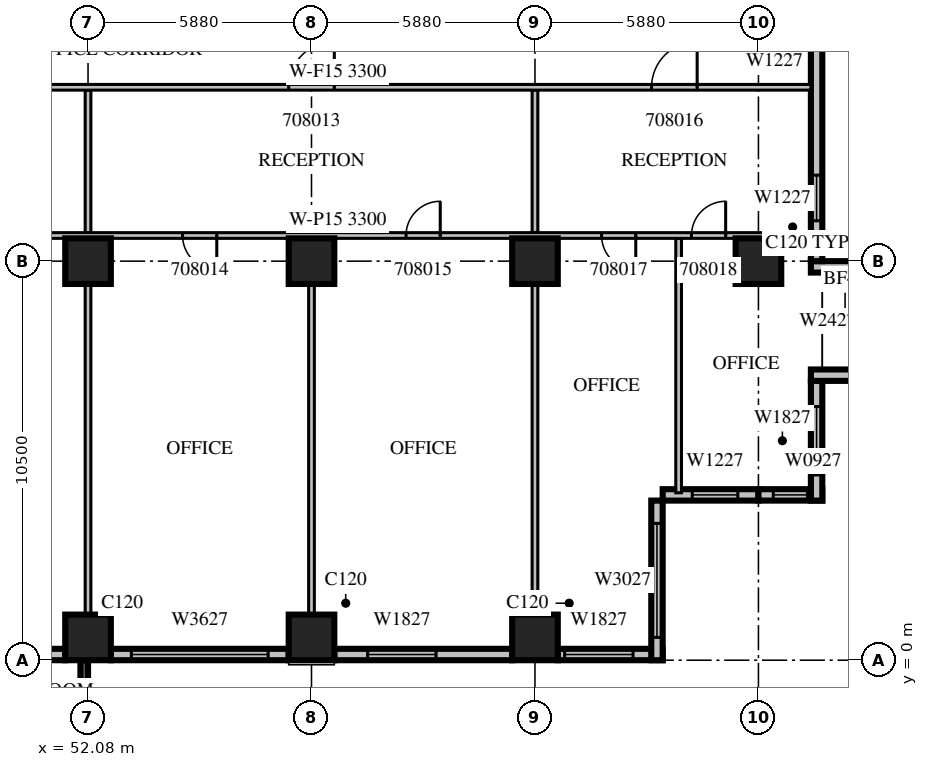
"""IFC4 building model, lengths in metres.
Left out: names, types, materials, properties, quantities, classifications, styles, units other than length and angle.
Written with IfcOpenShell. Run it as: python <this file> out.ifc"""

import sys

from ifc_helpers import new_model, si_unit, direction, frame, frame_2d, origin, origin_2d, place, context, subcontext, project, spatial, rectangle, extrude, source, transform, mapped, element, fill, save


model = new_model("IFC4")
c1 = context("Model", 3, precision=1e-05, world=origin(), true_north=direction((0.0, 1.0)))
c2 = subcontext(c1, "Body", "Model", "MODEL_VIEW")
j1 = project(units=[si_unit("LENGTHUNIT", "METRE"), si_unit("PLANEANGLEUNIT", "RADIAN")], contexts=[c1])
p1 = place(None, origin())
s1 = spatial("IfcSite", under=j1, at=p1, CompositionType="ELEMENT")
p2 = place(p1, origin())
s2 = spatial("IfcBuilding", under=s1, at=p2, CompositionType="ELEMENT")
p3 = place(p2, frame((0.0, 0.0, 44.7)))
s3 = spatial("IfcBuildingStorey", under=s2, at=p3, CompositionType="ELEMENT", Elevation=44.7)
m1 = source(origin(), c2, "Body", "SweptSolid", [
    extrude(rectangle(XDim=1.2, YDim=1.2, at=origin_2d()), origin(), (0.0, 0.0, 1.0), 4.2),
])
for number, where, z_axis, x_axis in (
    (1, (52.08, 0.6, 0.0), (0.0, 0.0, 1.0), (1.0, 0.0, 0.0)),
    (2, (57.96, 0.6, 0.0), (0.0, 0.0, 1.0), (1.0, 0.0, 0.0)),
    (3, (63.84, 0.6, 0.0), (0.0, 0.0, 1.0), (1.0, 0.0, 0.0)),
    (4, (52.08, 10.5, 0.0), (0.0, 0.0, 1.0), (1.0, 0.0, 0.0)),
    (5, (57.96, 10.5, 0.0), (0.0, 0.0, 1.0), (1.0, 0.0, 0.0)),
    (6, (63.84, 10.5, 0.0), (0.0, 0.0, 1.0), (1.0, 0.0, 0.0)),
    (7, (69.72, 10.5, 0.0), (0.0, 0.0, 1.0), (1.0, 0.0, 0.0)),
):
    element("IfcColumn", number, at=place(p3, frame(where, z_axis=z_axis, x_axis=x_axis)), inside=s3, PredefinedType="COLUMN", context=c2, shape_type="MappedRepresentation", body=[
        mapped(m1, transform((0.0, 0.0, 0.0), scale=1.0)),
    ])
m2 = source(origin(), c2, "Body", "SweptSolid", [
    extrude(rectangle(XDim=4.68, YDim=0.3, at=frame_2d((2.34, 0.0))), origin(), (0.0, 0.0, 1.0), 3.8),
])
p4 = place(p3, frame((46.8, 0.15, 0.0), z_axis=(0.0, 0.0, 1.0), x_axis=(1.0, 0.0, 0.0)))
e8 = element("IfcWall", 8, at=p4, inside=s3, PredefinedType="STANDARD", context=c2, shape_type="MappedRepresentation", body=[
    mapped(m2, transform((0.0, 0.0, 0.0), scale=1.0)),
])
m3 = source(origin(), c2, "Body", "SweptSolid", [
    extrude(rectangle(XDim=1.0, YDim=2.1, at=frame_2d((0.5, 1.05))), frame((0.0, 0.16, 0.0), z_axis=(0.0, -1.0, 0.0), x_axis=(1.0, 0.0, 0.0)), (0.0, 0.0, 1.0), 0.32),
])
p5 = place(p4, frame((1.84, 0.0, 0.0)))
e9 = element("IfcOpeningElement", 9, at=p5, cuts=e8, PredefinedType="OPENING", context=c2, shape_type="MappedRepresentation", body=[
    mapped(m3, transform((0.0, 0.0, 0.0), scale=1.0)),
])
p6 = place(p3, frame((52.68, 0.15, 0.0), z_axis=(0.0, 0.0, 1.0), x_axis=(1.0, 0.0, 0.0)))
e10 = element("IfcWall", 10, at=p6, inside=s3, PredefinedType="STANDARD", context=c2, shape_type="MappedRepresentation", body=[
    mapped(m2, transform((0.0, 0.0, 0.0), scale=1.0)),
])
m4 = source(origin(), c2, "Body", "SweptSolid", [
    extrude(rectangle(XDim=3.6, YDim=2.7, at=frame_2d((1.8, 1.35))), frame((0.0, 0.16, 0.0), z_axis=(0.0, -1.0, 0.0), x_axis=(1.0, 0.0, 0.0)), (0.0, 0.0, 1.0), 0.32),
])
p7 = place(p6, frame((0.54, 0.0, 0.6)))
e11 = element("IfcOpeningElement", 11, at=p7, cuts=e10, PredefinedType="OPENING", context=c2, shape_type="MappedRepresentation", body=[
    mapped(m4, transform((0.0, 0.0, 0.0), scale=1.0)),
])
p8 = place(p3, frame((58.56, 0.15, 0.0), z_axis=(0.0, 0.0, 1.0), x_axis=(1.0, 0.0, 0.0)))
e12 = element("IfcWall", 12, at=p8, inside=s3, PredefinedType="STANDARD", context=c2, shape_type="MappedRepresentation", body=[
    mapped(m2, transform((0.0, 0.0, 0.0), scale=1.0)),
])
m5 = source(origin(), c2, "Body", "SweptSolid", [
    extrude(rectangle(XDim=1.8, YDim=2.7, at=frame_2d((0.9, 1.35))), frame((0.0, 0.16, 0.0), z_axis=(0.0, -1.0, 0.0), x_axis=(1.0, 0.0, 0.0)), (0.0, 0.0, 1.0), 0.32),
])
p9 = place(p8, frame((0.877, 0.0, 0.6)))
e13 = element("IfcOpeningElement", 13, at=p9, cuts=e12, PredefinedType="OPENING", context=c2, shape_type="MappedRepresentation", body=[
    mapped(m5, transform((0.0, 0.0, 0.0), scale=1.0)),
])
m6 = source(origin(), c2, "Body", "SweptSolid", [
    extrude(rectangle(XDim=2.76, YDim=0.3, at=frame_2d((1.38, 0.0))), origin(), (0.0, 0.0, 1.0), 3.8),
])
p10 = place(p3, frame((64.44, 0.15, 0.0), z_axis=(0.0, 0.0, 1.0), x_axis=(1.0, 0.0, 0.0)))
e14 = element("IfcWall", 14, at=p10, inside=s3, PredefinedType="STANDARD", context=c2, shape_type="MappedRepresentation", body=[
    mapped(m6, transform((0.0, 0.0, 0.0), scale=1.0)),
])
p11 = place(p10, frame((0.18, 0.0, 0.6)))
e15 = element("IfcOpeningElement", 15, at=p11, cuts=e14, PredefinedType="OPENING", context=c2, shape_type="MappedRepresentation", body=[
    mapped(m5, transform((0.0, 0.0, 0.0), scale=1.0)),
])
m7 = source(origin(), c2, "Body", "SweptSolid", [
    extrude(rectangle(XDim=4.2, YDim=0.3, at=frame_2d((2.1, 0.0))), origin(), (0.0, 0.0, 1.0), 3.8),
])
p12 = place(p3, frame((67.05, 0.0, 0.0), z_axis=(0.0, 0.0, 1.0), x_axis=(0.0, 1.0, 0.0)))
e16 = element("IfcWall", 16, at=p12, inside=s3, PredefinedType="STANDARD", context=c2, shape_type="MappedRepresentation", body=[
    mapped(m7, transform((0.0, 0.0, 0.0), scale=1.0)),
])
m8 = source(origin(), c2, "Body", "SweptSolid", [
    extrude(rectangle(XDim=3.0, YDim=2.7, at=frame_2d((1.5, 1.35))), frame((0.0, 0.16, 0.0), z_axis=(0.0, -1.0, 0.0), x_axis=(1.0, 0.0, 0.0)), (0.0, 0.0, 1.0), 0.32),
])
p13 = place(p12, frame((0.6, 0.0, 0.6)))
e17 = element("IfcOpeningElement", 17, at=p13, cuts=e16, PredefinedType="OPENING", context=c2, shape_type="MappedRepresentation", body=[
    mapped(m8, transform((0.0, 0.0, 0.0), scale=1.0)),
])
m9 = source(origin(), c2, "Body", "SweptSolid", [
    extrude(rectangle(XDim=2.52, YDim=0.3, at=frame_2d((1.26, 0.0))), origin(), (0.0, 0.0, 1.0), 3.8),
])
p14 = place(p3, frame((67.2, 4.35, 0.0), z_axis=(0.0, 0.0, 1.0), x_axis=(1.0, 0.0, 0.0)))
e18 = element("IfcWall", 18, at=p14, inside=s3, PredefinedType="STANDARD", context=c2, shape_type="MappedRepresentation", body=[
    mapped(m9, transform((0.0, 0.0, 0.0), scale=1.0)),
])
m10 = source(origin(), c2, "Body", "SweptSolid", [
    extrude(rectangle(XDim=1.2, YDim=2.7, at=frame_2d((0.6, 1.35))), frame((0.0, 0.16, 0.0), z_axis=(0.0, -1.0, 0.0), x_axis=(1.0, 0.0, 0.0)), (0.0, 0.0, 1.0), 0.32),
])
p15 = place(p14, frame((0.777, 0.0, 0.6)))
e19 = element("IfcOpeningElement", 19, at=p15, cuts=e18, PredefinedType="OPENING", context=c2, shape_type="MappedRepresentation", body=[
    mapped(m10, transform((0.0, 0.0, 0.0), scale=1.0)),
])
m11 = source(origin(), c2, "Body", "SweptSolid", [
    extrude(rectangle(XDim=1.68, YDim=0.3, at=frame_2d((0.84, 0.0))), origin(), (0.0, 0.0, 1.0), 3.8),
])
p16 = place(p3, frame((69.72, 4.35, 0.0), z_axis=(0.0, 0.0, 1.0), x_axis=(1.0, 0.0, 0.0)))
e20 = element("IfcWall", 20, at=p16, inside=s3, PredefinedType="STANDARD", context=c2, shape_type="MappedRepresentation", body=[
    mapped(m11, transform((0.0, 0.0, 0.0), scale=1.0)),
])
m12 = source(origin(), c2, "Body", "SweptSolid", [
    extrude(rectangle(XDim=0.9, YDim=2.7, at=frame_2d((0.45, 1.35))), frame((0.0, 0.16, 0.0), z_axis=(0.0, -1.0, 0.0), x_axis=(1.0, 0.0, 0.0)), (0.0, 0.0, 1.0), 0.32),
])
p17 = place(p16, frame((0.39, 0.0, 0.6)))
e21 = element("IfcOpeningElement", 21, at=p17, cuts=e20, PredefinedType="OPENING", context=c2, shape_type="MappedRepresentation", body=[
    mapped(m12, transform((0.0, 0.0, 0.0), scale=1.0)),
])
m13 = source(origin(), c2, "Body", "SweptSolid", [
    extrude(rectangle(XDim=3.15, YDim=0.3, at=frame_2d((1.575, 0.0))), origin(), (0.0, 0.0, 1.0), 3.8),
])
p18 = place(p3, frame((71.25, 4.2, 0.0), z_axis=(0.0, 0.0, 1.0), x_axis=(0.0, 1.0, 0.0)))
e22 = element("IfcWall", 22, at=p18, inside=s3, PredefinedType="STANDARD", context=c2, shape_type="MappedRepresentation", body=[
    mapped(m13, transform((0.0, 0.0, 0.0), scale=1.0)),
])
p19 = place(p18, frame((0.675, 0.0, 0.6)))
e23 = element("IfcOpeningElement", 23, at=p19, cuts=e22, PredefinedType="OPENING", context=c2, shape_type="MappedRepresentation", body=[
    mapped(m5, transform((0.0, 0.0, 0.0), scale=1.0)),
])
m14 = source(origin(), c2, "Body", "SweptSolid", [
    extrude(rectangle(XDim=1.2, YDim=0.3, at=frame_2d((0.6, 0.0))), origin(), (0.0, 0.0, 1.0), 3.8),
])
for number, where, z_axis, x_axis in (
    (24, (71.1, 7.5, 0.0), (0.0, 0.0, 1.0), (1.0, 0.0, 0.0)),
    (25, (71.1, 10.35, 0.0), (0.0, 0.0, 1.0), (1.0, 0.0, 0.0)),
):
    element("IfcWall", number, at=place(p3, frame(where, z_axis=z_axis, x_axis=x_axis)), inside=s3, PredefinedType="STANDARD", context=c2, shape_type="MappedRepresentation", body=[
        mapped(m14, transform((0.0, 0.0, 0.0), scale=1.0)),
    ])
m15 = source(origin(), c2, "Body", "SweptSolid", [
    extrude(rectangle(XDim=6.3, YDim=0.3, at=frame_2d((3.15, 0.0))), origin(), (0.0, 0.0, 1.0), 3.8),
])
p20 = place(p3, frame((71.25, 10.5, 0.0), z_axis=(0.0, 0.0, 1.0), x_axis=(0.0, 1.0, 0.0)))
e26 = element("IfcWall", 26, at=p20, inside=s3, PredefinedType="STANDARD", context=c2, shape_type="MappedRepresentation", body=[
    mapped(m15, transform((0.0, 0.0, 0.0), scale=1.0)),
])
p21 = place(p20, frame((1.062, 0.0, 0.6)))
e27 = element("IfcOpeningElement", 27, at=p21, cuts=e26, PredefinedType="OPENING", context=c2, shape_type="MappedRepresentation", body=[
    mapped(m10, transform((0.0, 0.0, 0.0), scale=1.0)),
])
m16 = source(origin(), c2, "Body", "SweptSolid", [
    extrude(rectangle(XDim=3.9, YDim=0.2, at=frame_2d((1.95, 0.0))), origin(), (0.0, 0.0, 1.0), 3.79),
])
p22 = place(p3, frame((51.98, 0.0, 0.0), z_axis=(0.0, 0.0, 1.0), x_axis=(0.0, -1.0, 0.0)))
e28 = element("IfcWall", 28, at=p22, inside=s3, PredefinedType="SOLIDWALL", context=c2, shape_type="MappedRepresentation", body=[
    mapped(m16, transform((0.0, 0.0, 0.0), scale=1.0)),
])
m17 = source(origin(), c2, "Body", "SweptSolid", [
    extrude(rectangle(XDim=2.4, YDim=2.7, at=frame_2d((1.2, 1.35))), frame((0.0, 0.11, 0.0), z_axis=(0.0, -1.0, 0.0), x_axis=(1.0, 0.0, 0.0)), (0.0, 0.0, 1.0), 0.22),
])
p23 = place(p22, frame((0.75, 0.0, 0.6)))
e29 = element("IfcOpeningElement", 29, at=p23, cuts=e28, PredefinedType="OPENING", context=c2, shape_type="MappedRepresentation", body=[
    mapped(m17, transform((0.0, 0.0, 0.0), scale=1.0)),
])
m18 = source(origin(), c2, "Body", "SweptSolid", [
    extrude(rectangle(XDim=8.702, YDim=0.15, at=frame_2d((4.351, 0.0))), origin(), (0.0, 0.0, 1.0), 3.8),
])
p24 = place(p3, frame((57.96, 1.199, 0.0), z_axis=(0.0, 0.0, 1.0), x_axis=(0.0, 1.0, 0.0)))
e30 = element("IfcWall", 30, at=p24, inside=s3, PredefinedType="PARTITIONING", context=c2, shape_type="MappedRepresentation", body=[
    mapped(m18, transform((0.0, 0.0, 0.0), scale=1.0)),
])
m19 = source(origin(), c2, "Body", "SweptSolid", [
    extrude(rectangle(XDim=6.695, YDim=0.15, at=frame_2d((3.348, 0.0))), origin(), (0.0, 0.0, 1.0), 3.8),
])
p25 = place(p3, frame((67.62, 4.405, 0.0), z_axis=(0.0, 0.0, 1.0), x_axis=(0.0, 1.0, 0.0)))
e31 = element("IfcWall", 31, at=p25, inside=s3, PredefinedType="PARTITIONING", context=c2, shape_type="MappedRepresentation", body=[
    mapped(m19, transform((0.0, 0.0, 0.0), scale=1.0)),
])
p26 = place(p3, frame((52.08, 1.199, 0.0), z_axis=(0.0, 0.0, 1.0), x_axis=(0.0, 1.0, 0.0)))
e32 = element("IfcWall", 32, at=p26, inside=s3, PredefinedType="PARTITIONING", context=c2, shape_type="MappedRepresentation", body=[
    mapped(m18, transform((0.0, 0.0, 0.0), scale=1.0)),
])
m20 = source(origin(), c2, "Body", "SweptSolid", [
    extrude(rectangle(XDim=3.75, YDim=0.15, at=frame_2d((1.875, 0.0))), origin(), (0.0, 0.0, 1.0), 3.8),
])
p27 = place(p3, frame((52.08, 11.25, 0.0), z_axis=(0.0, 0.0, 1.0), x_axis=(0.0, 1.0, 0.0)))
e33 = element("IfcWall", 33, at=p27, inside=s3, PredefinedType="PARTITIONING", context=c2, shape_type="MappedRepresentation", body=[
    mapped(m20, transform((0.0, 0.0, 0.0), scale=1.0)),
])
p28 = place(p3, frame((63.84, 1.199, 0.0), z_axis=(0.0, 0.0, 1.0), x_axis=(0.0, 1.0, 0.0)))
e34 = element("IfcWall", 34, at=p28, inside=s3, PredefinedType="PARTITIONING", context=c2, shape_type="MappedRepresentation", body=[
    mapped(m18, transform((0.0, 0.0, 0.0), scale=1.0)),
])
p29 = place(p3, frame((63.84, 11.25, 0.0), z_axis=(0.0, 0.0, 1.0), x_axis=(0.0, 1.0, 0.0)))
e35 = element("IfcWall", 35, at=p29, inside=s3, PredefinedType="PARTITIONING", context=c2, shape_type="MappedRepresentation", body=[
    mapped(m20, transform((0.0, 0.0, 0.0), scale=1.0)),
])
p30 = place(p3, frame((71.1, 11.175, 0.0), z_axis=(0.0, 0.0, 1.0), x_axis=(-1.0, 0.0, 0.0)))
e36 = element("IfcWall", 36, at=p30, inside=s3, PredefinedType="PARTITIONING", context=c2, shape_type="SweptSolid", body=[
    extrude(rectangle(XDim=24.9, YDim=0.15, at=frame_2d((12.45, 0.0))), origin(), (0.0, 0.0, 1.0), 3.3),
])
m21 = source(origin(), c2, "Body", "SweptSolid", [
    extrude(rectangle(XDim=1.1, YDim=2.1, at=frame_2d((0.55, 1.05))), frame((0.0, 0.085, 0.0), z_axis=(0.0, -1.0, 0.0), x_axis=(1.0, 0.0, 0.0)), (0.0, 0.0, 1.0), 0.17),
])
p31 = place(p30, frame((22.875, 0.0, 0.0)))
e37 = element("IfcOpeningElement", 37, at=p31, cuts=e36, PredefinedType="OPENING", context=c2, shape_type="MappedRepresentation", body=[
    mapped(m21, transform((0.0, 0.0, 0.0), scale=1.0)),
])
m22 = source(origin(), c2, "Body", "SweptSolid", [
    extrude(rectangle(XDim=0.9, YDim=2.1, at=frame_2d((0.45, 1.05))), frame((0.0, 0.085, 0.0), z_axis=(0.0, -1.0, 0.0), x_axis=(1.0, 0.0, 0.0)), (0.0, 0.0, 1.0), 0.17),
])
p32 = place(p30, frame((15.633, 0.0, 0.0)))
e38 = element("IfcOpeningElement", 38, at=p32, cuts=e36, PredefinedType="OPENING", context=c2, shape_type="MappedRepresentation", body=[
    mapped(m22, transform((0.0, 0.0, 0.0), scale=1.0)),
])
p33 = place(p30, frame((9.752, 0.0, 0.0)))
e39 = element("IfcOpeningElement", 39, at=p33, cuts=e36, PredefinedType="OPENING", context=c2, shape_type="MappedRepresentation", body=[
    mapped(m22, transform((0.0, 0.0, 0.0), scale=1.0)),
])
p34 = place(p30, frame((4.607, 0.0, 0.0)))
e40 = element("IfcOpeningElement", 40, at=p34, cuts=e36, PredefinedType="OPENING", context=c2, shape_type="MappedRepresentation", body=[
    mapped(m22, transform((0.0, 0.0, 0.0), scale=1.0)),
])
p35 = place(p30, frame((2.243, 0.0, 0.0)))
e41 = element("IfcOpeningElement", 41, at=p35, cuts=e36, PredefinedType="OPENING", context=c2, shape_type="MappedRepresentation", body=[
    mapped(m22, transform((0.0, 0.0, 0.0), scale=1.0)),
])
m23 = source(origin(), c2, "Body", "SweptSolid", [
    extrude(rectangle(XDim=24.9, YDim=0.15, at=frame_2d((12.45, 0.0))), origin(), (0.0, 0.0, 1.0), 3.3),
])
p36 = place(p3, frame((71.1, 15.075, 0.0), z_axis=(0.0, 0.0, 1.0), x_axis=(-1.0, 0.0, 0.0)))
e42 = element("IfcWall", 42, at=p36, inside=s3, PredefinedType="PARTITIONING", context=c2, shape_type="MappedRepresentation", body=[
    mapped(m23, transform((0.0, 0.0, 0.0), scale=1.0)),
])
p37 = place(p36, frame((23.188, 0.0, 0.0)))
e43 = element("IfcOpeningElement", 43, at=p37, cuts=e42, PredefinedType="OPENING", context=c2, shape_type="MappedRepresentation", body=[
    mapped(m21, transform((0.0, 0.0, 0.0), scale=1.0)),
])
p38 = place(p36, frame((20.348, 0.0, 0.0)))
e44 = element("IfcOpeningElement", 44, at=p38, cuts=e42, PredefinedType="OPENING", context=c2, shape_type="MappedRepresentation", body=[
    mapped(m22, transform((0.0, 0.0, 0.0), scale=1.0)),
])
m24 = source(origin(), c2, "Body", "SweptSolid", [
    extrude(rectangle(XDim=1.2, YDim=2.1, at=frame_2d((0.6, 1.05))), frame((0.0, 0.085, 0.0), z_axis=(0.0, -1.0, 0.0), x_axis=(1.0, 0.0, 0.0)), (0.0, 0.0, 1.0), 0.17),
])
p39 = place(p36, frame((12.54, 0.0, 0.0)))
e45 = element("IfcOpeningElement", 45, at=p39, cuts=e42, PredefinedType="OPENING", context=c2, shape_type="MappedRepresentation", body=[
    mapped(m24, transform((0.0, 0.0, 0.0), scale=1.0)),
])
p40 = place(p36, frame((2.993, 0.0, 0.0)))
e46 = element("IfcOpeningElement", 46, at=p40, cuts=e42, PredefinedType="OPENING", context=c2, shape_type="MappedRepresentation", body=[
    mapped(m24, transform((0.0, 0.0, 0.0), scale=1.0)),
])
m25 = source(origin(), c2, "Body", "SweptSolid", [
    extrude(rectangle(XDim=3.6, YDim=2.7, at=frame_2d((1.8, 1.35))), frame((0.0, 0.03, 0.0), z_axis=(0.0, -1.0, 0.0), x_axis=(1.0, 0.0, 0.0)), (0.0, 0.0, 1.0), 0.06),
])
p41 = place(p7, origin())
e47 = element("IfcWindow", 47, at=p41, inside=s3, PartitioningType="SINGLE_PANEL", PredefinedType="WINDOW", context=c2, shape_type="MappedRepresentation", body=[
    mapped(m25, transform((0.0, 0.0, 0.0), scale=1.0)),
])
fill(e11, e47)
m26 = source(origin(), c2, "Body", "SweptSolid", [
    extrude(rectangle(XDim=1.8, YDim=2.7, at=frame_2d((0.9, 1.35))), frame((0.0, 0.03, 0.0), z_axis=(0.0, -1.0, 0.0), x_axis=(1.0, 0.0, 0.0)), (0.0, 0.0, 1.0), 0.06),
])
p42 = place(p9, origin())
e48 = element("IfcWindow", 48, at=p42, inside=s3, PartitioningType="SINGLE_PANEL", PredefinedType="WINDOW", context=c2, shape_type="MappedRepresentation", body=[
    mapped(m26, transform((0.0, 0.0, 0.0), scale=1.0)),
])
fill(e13, e48)
p43 = place(p11, origin())
e49 = element("IfcWindow", 49, at=p43, inside=s3, PartitioningType="SINGLE_PANEL", PredefinedType="WINDOW", context=c2, shape_type="MappedRepresentation", body=[
    mapped(m26, transform((0.0, 0.0, 0.0), scale=1.0)),
])
fill(e15, e49)
m27 = source(origin(), c2, "Body", "SweptSolid", [
    extrude(rectangle(XDim=3.0, YDim=2.7, at=frame_2d((1.5, 1.35))), frame((0.0, 0.03, 0.0), z_axis=(0.0, -1.0, 0.0), x_axis=(1.0, 0.0, 0.0)), (0.0, 0.0, 1.0), 0.06),
])
p44 = place(p13, origin())
e50 = element("IfcWindow", 50, at=p44, inside=s3, PartitioningType="SINGLE_PANEL", PredefinedType="WINDOW", context=c2, shape_type="MappedRepresentation", body=[
    mapped(m27, transform((0.0, 0.0, 0.0), scale=1.0)),
])
fill(e17, e50)
m28 = source(origin(), c2, "Body", "SweptSolid", [
    extrude(rectangle(XDim=1.2, YDim=2.7, at=frame_2d((0.6, 1.35))), frame((0.0, 0.03, 0.0), z_axis=(0.0, -1.0, 0.0), x_axis=(1.0, 0.0, 0.0)), (0.0, 0.0, 1.0), 0.06),
])
p45 = place(p15, origin())
e51 = element("IfcWindow", 51, at=p45, inside=s3, PartitioningType="SINGLE_PANEL", PredefinedType="WINDOW", context=c2, shape_type="MappedRepresentation", body=[
    mapped(m28, transform((0.0, 0.0, 0.0), scale=1.0)),
])
fill(e19, e51)
m29 = source(origin(), c2, "Body", "SweptSolid", [
    extrude(rectangle(XDim=0.9, YDim=2.7, at=frame_2d((0.45, 1.35))), frame((0.0, 0.03, 0.0), z_axis=(0.0, -1.0, 0.0), x_axis=(1.0, 0.0, 0.0)), (0.0, 0.0, 1.0), 0.06),
])
p46 = place(p17, origin())
e52 = element("IfcWindow", 52, at=p46, inside=s3, PartitioningType="SINGLE_PANEL", PredefinedType="WINDOW", context=c2, shape_type="MappedRepresentation", body=[
    mapped(m29, transform((0.0, 0.0, 0.0), scale=1.0)),
])
fill(e21, e52)
p47 = place(p19, origin())
e53 = element("IfcWindow", 53, at=p47, inside=s3, PartitioningType="SINGLE_PANEL", PredefinedType="WINDOW", context=c2, shape_type="MappedRepresentation", body=[
    mapped(m26, transform((0.0, 0.0, 0.0), scale=1.0)),
])
fill(e23, e53)
p48 = place(p21, origin())
e54 = element("IfcWindow", 54, at=p48, inside=s3, PartitioningType="SINGLE_PANEL", PredefinedType="WINDOW", context=c2, shape_type="MappedRepresentation", body=[
    mapped(m28, transform((0.0, 0.0, 0.0), scale=1.0)),
])
fill(e27, e54)
m30 = source(origin(), c2, "Body", "SweptSolid", [
    extrude(rectangle(XDim=1.2, YDim=2.1, at=frame_2d((0.6, 1.05))), frame((0.0, 0.025, 0.0), z_axis=(0.0, -1.0, 0.0), x_axis=(1.0, 0.0, 0.0)), (0.0, 0.0, 1.0), 0.05),
])
p49 = place(p39, origin())
e55 = element("IfcDoor", 55, at=p49, inside=s3, OperationType="SINGLE_SWING_RIGHT", PredefinedType="DOOR", context=c2, shape_type="MappedRepresentation", body=[
    mapped(m30, transform((0.0, 0.0, 0.0), scale=1.0)),
])
fill(e45, e55)
m31 = source(origin(), c2, "Body", "SweptSolid", [
    extrude(rectangle(XDim=0.9, YDim=2.1, at=frame_2d((0.45, 1.05))), frame((0.0, 0.025, 0.0), z_axis=(0.0, -1.0, 0.0), x_axis=(1.0, 0.0, 0.0)), (0.0, 0.0, 1.0), 0.05),
])
p50 = place(p32, origin())
e56 = element("IfcDoor", 56, at=p50, inside=s3, OperationType="SINGLE_SWING_LEFT", PredefinedType="DOOR", context=c2, shape_type="MappedRepresentation", body=[
    mapped(m31, transform((0.0, 0.0, 0.0), scale=1.0)),
])
fill(e38, e56)
p51 = place(p33, origin())
e57 = element("IfcDoor", 57, at=p51, inside=s3, OperationType="SINGLE_SWING_RIGHT", PredefinedType="DOOR", context=c2, shape_type="MappedRepresentation", body=[
    mapped(m31, transform((0.0, 0.0, 0.0), scale=1.0)),
])
fill(e39, e57)
p52 = place(p40, origin())
e58 = element("IfcDoor", 58, at=p52, inside=s3, OperationType="SINGLE_SWING_RIGHT", PredefinedType="DOOR", context=c2, shape_type="MappedRepresentation", body=[
    mapped(m30, transform((0.0, 0.0, 0.0), scale=1.0)),
])
fill(e46, e58)
p53 = place(p34, origin())
e59 = element("IfcDoor", 59, at=p53, inside=s3, OperationType="SINGLE_SWING_LEFT", PredefinedType="DOOR", context=c2, shape_type="MappedRepresentation", body=[
    mapped(m31, transform((0.0, 0.0, 0.0), scale=1.0)),
])
fill(e40, e59)
p54 = place(p35, origin())
e60 = element("IfcDoor", 60, at=p54, inside=s3, OperationType="SINGLE_SWING_RIGHT", PredefinedType="DOOR", context=c2, shape_type="MappedRepresentation", body=[
    mapped(m31, transform((0.0, 0.0, 0.0), scale=1.0)),
])
fill(e41, e60)
save(model, sys.argv[1])
